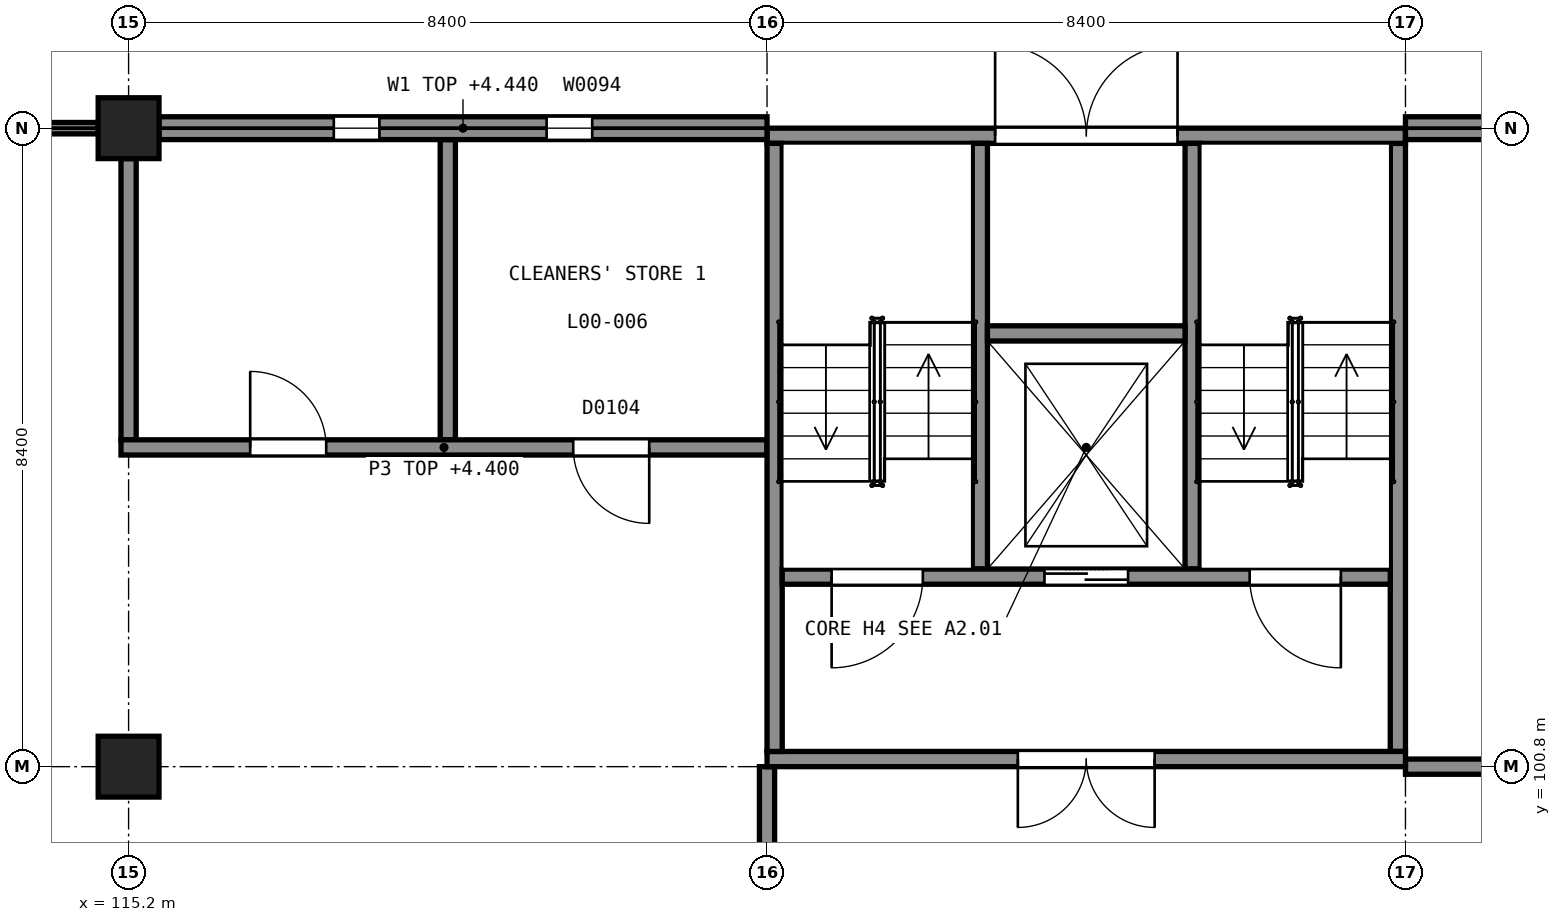
"""IFC4 building model, lengths in metres.
Left out: names, types, materials, properties, quantities, classifications, styles, units other than length and angle.
Written with IfcOpenShell. Run it as: python <this file> out.ifc"""

import sys

from ifc_helpers import new_model, si_unit, direction, frame, frame_2d, origin, origin_2d, place, context, subcontext, project, spatial, rectangle, extrude, element, fill, save


model = new_model("IFC4")
c1 = context("Model", 3, precision=1e-05, world=origin(), true_north=direction((0.0, 1.0)))
c2 = subcontext(c1, "Body", "Model", "MODEL_VIEW")
j1 = project(units=[si_unit("LENGTHUNIT", "METRE"), si_unit("PLANEANGLEUNIT", "RADIAN")], contexts=[c1])
p1 = place(None, origin())
s1 = spatial("IfcSite", under=j1, at=p1, CompositionType="ELEMENT")
p2 = place(p1, origin())
s2 = spatial("IfcBuilding", under=s1, at=p2, CompositionType="ELEMENT")
p3 = place(p2, origin())
s3 = spatial("IfcBuildingStorey", under=s2, at=p3, CompositionType="ELEMENT", Elevation=0.0)
p4 = place(p3, frame((123.6, 100.9, -1.8), z_axis=(0.0, 0.0, 1.0), x_axis=(1.0, 0.0, 0.0)))
e1 = element("IfcWall", 1, at=p4, inside=s3, PredefinedType="SHEAR", context=c2, shape_type="SweptSolid", body=[
    extrude(rectangle(XDim=8.4, YDim=0.2, at=frame_2d((4.2, 0.0))), origin(), (0.0, 0.0, 1.0), 7.3),
])
p5 = place(p4, frame((3.3, 0.0, 1.8)))
e2 = element("IfcOpeningElement", 2, at=p5, cuts=e1, PredefinedType="OPENING", context=c2, shape_type="SweptSolid", body=[
    extrude(rectangle(XDim=1.8, YDim=2.1, at=frame_2d((0.9, 1.05))), frame((0.0, 0.11, 0.0), z_axis=(0.0, -1.0, 0.0), x_axis=(1.0, 0.0, 0.0)), (0.0, 0.0, 1.0), 0.22),
])
p6 = place(p3, frame((123.6, 109.1, -1.8), z_axis=(0.0, 0.0, 1.0), x_axis=(1.0, 0.0, 0.0)))
e3 = element("IfcWall", 3, at=p6, inside=s3, PredefinedType="SHEAR", context=c2, shape_type="SweptSolid", body=[
    extrude(rectangle(XDim=8.4, YDim=0.2, at=frame_2d((4.2, 0.0))), origin(), (0.0, 0.0, 1.0), 7.3),
])
p7 = place(p6, frame((3.001, 0.0, 1.8)))
e4 = element("IfcOpeningElement", 4, at=p7, cuts=e3, PredefinedType="OPENING", context=c2, shape_type="SweptSolid", body=[
    extrude(rectangle(XDim=2.4, YDim=2.1, at=frame_2d((1.2, 1.05))), frame((0.0, 0.11, 0.0), z_axis=(0.0, -1.0, 0.0), x_axis=(1.0, 0.0, 0.0)), (0.0, 0.0, 1.0), 0.22),
])
for number, where, z_axis, x_axis in (
    (5, (123.7, 101.0, -1.8), (0.0, 0.0, 1.0), (0.0, 1.0, 0.0)),
    (6, (131.9, 101.0, -1.8), (0.0, 0.0, 1.0), (0.0, 1.0, 0.0)),
):
    element("IfcWall", number, at=place(p3, frame(where, z_axis=z_axis, x_axis=x_axis)), inside=s3, PredefinedType="SHEAR", context=c2, shape_type="SweptSolid", body=[
        extrude(rectangle(XDim=8.0, YDim=0.2, at=frame_2d((4.0, 0.0))), origin(), (0.0, 0.0, 1.0), 7.3),
    ])
p8 = place(p3, frame((123.8, 103.3, -1.8), z_axis=(0.0, 0.0, 1.0), x_axis=(1.0, 0.0, 0.0)))
e7 = element("IfcWall", 7, at=p8, inside=s3, PredefinedType="SHEAR", context=c2, shape_type="SweptSolid", body=[
    extrude(rectangle(XDim=8.0, YDim=0.2, at=frame_2d((4.0, 0.0))), origin(), (0.0, 0.0, 1.0), 7.3),
])
p9 = place(p8, frame((0.65, 0.0, 1.8)))
e8 = element("IfcOpeningElement", 8, at=p9, cuts=e7, PredefinedType="OPENING", context=c2, shape_type="SweptSolid", body=[
    extrude(rectangle(XDim=1.2, YDim=2.1, at=frame_2d((0.6, 1.05))), frame((0.0, 0.11, 0.0), z_axis=(0.0, -1.0, 0.0), x_axis=(1.0, 0.0, 0.0)), (0.0, 0.0, 1.0), 0.22),
])
p10 = place(p8, frame((6.15, 0.0, 1.8)))
e9 = element("IfcOpeningElement", 9, at=p10, cuts=e7, PredefinedType="OPENING", context=c2, shape_type="SweptSolid", body=[
    extrude(rectangle(XDim=1.2, YDim=2.1, at=frame_2d((0.6, 1.05))), frame((0.0, 0.11, 0.0), z_axis=(0.0, -1.0, 0.0), x_axis=(1.0, 0.0, 0.0)), (0.0, 0.0, 1.0), 0.22),
])
p11 = place(p8, frame((3.45, 0.0, 1.8)))
e10 = element("IfcOpeningElement", 10, at=p11, cuts=e7, PredefinedType="OPENING", context=c2, shape_type="SweptSolid", body=[
    extrude(rectangle(XDim=1.1, YDim=2.1, at=frame_2d((0.55, 1.05))), frame((0.0, 0.11, 0.0), z_axis=(0.0, -1.0, 0.0), x_axis=(1.0, 0.0, 0.0)), (0.0, 0.0, 1.0), 0.22),
])
for number, where, z_axis, x_axis in (
    (11, (126.4, 103.4, -1.8), (0.0, 0.0, 1.0), (0.0, 1.0, 0.0)),
    (12, (129.2, 103.4, -1.8), (0.0, 0.0, 1.0), (0.0, 1.0, 0.0)),
):
    element("IfcWall", number, at=place(p3, frame(where, z_axis=z_axis, x_axis=x_axis)), inside=s3, PredefinedType="SHEAR", context=c2, shape_type="SweptSolid", body=[
        extrude(rectangle(XDim=5.6, YDim=0.2, at=frame_2d((2.8, 0.0))), origin(), (0.0, 0.0, 1.0), 7.3),
    ])
p12 = place(p3, frame((126.5, 106.5, -1.8), z_axis=(0.0, 0.0, 1.0), x_axis=(1.0, 0.0, 0.0)))
e13 = element("IfcWall", 13, at=p12, inside=s3, PredefinedType="SHEAR", context=c2, shape_type="SweptSolid", body=[
    extrude(rectangle(XDim=2.6, YDim=0.2, at=frame_2d((1.3, 0.0))), origin(), (0.0, 0.0, 1.0), 7.3),
])
for number, where, z_axis, x_axis in (
    (14, (115.2, 100.8, -0.3), (0.0, 0.0, 1.0), (1.0, 0.0, 0.0)),
    (15, (115.2, 109.2, -0.3), (0.0, 0.0, 1.0), (1.0, 0.0, 0.0)),
):
    element("IfcColumn", number, at=place(p3, frame(where, z_axis=z_axis, x_axis=x_axis)), inside=s3, PredefinedType="COLUMN", context=c2, shape_type="SweptSolid", body=[
        extrude(rectangle(XDim=0.8, YDim=0.8, at=origin_2d()), origin(), (0.0, 0.0, 1.0), 5.8),
    ])
p13 = place(p3, frame((132.0, 109.2, 0.0), z_axis=(0.0, 0.0, 1.0), x_axis=(1.0, 0.0, 0.0)))
e16 = element("IfcWall", 16, at=p13, inside=s3, PredefinedType="SOLIDWALL", context=c2, shape_type="SweptSolid", body=[
    extrude(rectangle(XDim=8.4, YDim=0.3, at=frame_2d((4.2, 0.0))), origin(), (0.0, 0.0, 1.0), 4.44),
])
p14 = place(p13, frame((2.5, 0.0, 1.5)))
e17 = element("IfcOpeningElement", 17, at=p14, cuts=e16, PredefinedType="OPENING", context=c2, shape_type="SweptSolid", body=[
    extrude(rectangle(XDim=0.6, YDim=2.4, at=frame_2d((0.3, 1.2))), frame((0.0, 0.16, 0.0), z_axis=(0.0, -1.0, 0.0), x_axis=(1.0, 0.0, 0.0)), (0.0, 0.0, 1.0), 0.32),
])
p15 = place(p13, frame((5.3, 0.0, 1.5)))
e18 = element("IfcOpeningElement", 18, at=p15, cuts=e16, PredefinedType="OPENING", context=c2, shape_type="SweptSolid", body=[
    extrude(rectangle(XDim=0.6, YDim=2.4, at=frame_2d((0.3, 1.2))), frame((0.0, 0.16, 0.0), z_axis=(0.0, -1.0, 0.0), x_axis=(1.0, 0.0, 0.0)), (0.0, 0.0, 1.0), 0.32),
])
p16 = place(p3, frame((115.6, 109.2, 0.0), z_axis=(0.0, 0.0, 1.0), x_axis=(1.0, 0.0, 0.0)))
e19 = element("IfcWall", 19, at=p16, inside=s3, PredefinedType="SOLIDWALL", context=c2, shape_type="SweptSolid", body=[
    extrude(rectangle(XDim=8.0, YDim=0.3, at=frame_2d((4.0, 0.0))), origin(), (0.0, 0.0, 1.0), 4.44),
])
p17 = place(p16, frame((2.3, 0.0, 1.5)))
e20 = element("IfcOpeningElement", 20, at=p17, cuts=e19, PredefinedType="OPENING", context=c2, shape_type="SweptSolid", body=[
    extrude(rectangle(XDim=0.6, YDim=2.4, at=frame_2d((0.3, 1.2))), frame((0.0, 0.16, 0.0), z_axis=(0.0, -1.0, 0.0), x_axis=(1.0, 0.0, 0.0)), (0.0, 0.0, 1.0), 0.32),
])
p18 = place(p16, frame((5.1, 0.0, 1.5)))
e21 = element("IfcOpeningElement", 21, at=p18, cuts=e19, PredefinedType="OPENING", context=c2, shape_type="SweptSolid", body=[
    extrude(rectangle(XDim=0.6, YDim=2.4, at=frame_2d((0.3, 1.2))), frame((0.0, 0.16, 0.0), z_axis=(0.0, -1.0, 0.0), x_axis=(1.0, 0.0, 0.0)), (0.0, 0.0, 1.0), 0.32),
])
p19 = place(p3, frame((107.2, 109.2, 0.0), z_axis=(0.0, 0.0, 1.0), x_axis=(1.0, 0.0, 0.0)))
e22 = element("IfcWall", 22, at=p19, inside=s3, PredefinedType="ELEMENTEDWALL", context=c2, shape_type="SweptSolid", body=[
    extrude(rectangle(XDim=7.6, YDim=0.15, at=frame_2d((3.8, 0.0))), origin(), (0.0, 0.0, 1.0), 4.44),
])
p20 = place(p19, frame((0.8, 0.0, 0.0)))
e23 = element("IfcOpeningElement", 23, at=p20, cuts=e22, PredefinedType="OPENING", context=c2, shape_type="SweptSolid", body=[
    extrude(rectangle(XDim=2.0, YDim=2.4, at=frame_2d((1.0, 1.2))), frame((0.0, 0.085, 0.0), z_axis=(0.0, -1.0, 0.0), x_axis=(1.0, 0.0, 0.0)), (0.0, 0.0, 1.0), 0.17),
])
p21 = place(p19, frame((0.8, 0.0, 2.6)))
e24 = element("IfcOpeningElement", 24, at=p21, cuts=e22, PredefinedType="OPENING", context=c2, shape_type="SweptSolid", body=[
    extrude(rectangle(XDim=2.0, YDim=1.74, at=frame_2d((1.0, 0.87))), frame((0.0, 0.085, 0.0), z_axis=(0.0, -1.0, 0.0), x_axis=(1.0, 0.0, 0.0)), (0.0, 0.0, 1.0), 0.17),
])
p22 = place(p19, frame((2.8, 0.0, 0.0)))
e25 = element("IfcOpeningElement", 25, at=p22, cuts=e22, PredefinedType="OPENING", context=c2, shape_type="SweptSolid", body=[
    extrude(rectangle(XDim=2.0, YDim=2.4, at=frame_2d((1.0, 1.2))), frame((0.0, 0.085, 0.0), z_axis=(0.0, -1.0, 0.0), x_axis=(1.0, 0.0, 0.0)), (0.0, 0.0, 1.0), 0.17),
])
p23 = place(p19, frame((2.8, 0.0, 2.6)))
e26 = element("IfcOpeningElement", 26, at=p23, cuts=e22, PredefinedType="OPENING", context=c2, shape_type="SweptSolid", body=[
    extrude(rectangle(XDim=2.0, YDim=1.74, at=frame_2d((1.0, 0.87))), frame((0.0, 0.085, 0.0), z_axis=(0.0, -1.0, 0.0), x_axis=(1.0, 0.0, 0.0)), (0.0, 0.0, 1.0), 0.17),
])
p24 = place(p19, frame((4.8, 0.0, 0.0)))
e27 = element("IfcOpeningElement", 27, at=p24, cuts=e22, PredefinedType="OPENING", context=c2, shape_type="SweptSolid", body=[
    extrude(rectangle(XDim=2.0, YDim=2.4, at=frame_2d((1.0, 1.2))), frame((0.0, 0.085, 0.0), z_axis=(0.0, -1.0, 0.0), x_axis=(1.0, 0.0, 0.0)), (0.0, 0.0, 1.0), 0.17),
])
p25 = place(p19, frame((4.8, 0.0, 2.6)))
e28 = element("IfcOpeningElement", 28, at=p25, cuts=e22, PredefinedType="OPENING", context=c2, shape_type="SweptSolid", body=[
    extrude(rectangle(XDim=2.0, YDim=1.74, at=frame_2d((1.0, 0.87))), frame((0.0, 0.085, 0.0), z_axis=(0.0, -1.0, 0.0), x_axis=(1.0, 0.0, 0.0)), (0.0, 0.0, 1.0), 0.17),
])
p26 = place(p3, frame((119.4, 105.1, 0.0), z_axis=(0.0, 0.0, 1.0), x_axis=(0.0, 1.0, 0.0)))
e29 = element("IfcWall", 29, at=p26, inside=s3, PredefinedType="PARTITIONING", context=c2, shape_type="SweptSolid", body=[
    extrude(rectangle(XDim=3.95, YDim=0.2, at=frame_2d((1.975, 0.0))), origin(), (0.0, 0.0, 1.0), 4.4),
])
p27 = place(p3, frame((115.2, 105.1, 0.0), z_axis=(0.0, 0.0, 1.0), x_axis=(0.0, 1.0, 0.0)))
e30 = element("IfcWall", 30, at=p27, inside=s3, PredefinedType="PARTITIONING", context=c2, shape_type="SweptSolid", body=[
    extrude(rectangle(XDim=3.7, YDim=0.2, at=frame_2d((1.85, 0.0))), origin(), (0.0, 0.0, 1.0), 4.4),
])
p28 = place(p3, frame((115.1, 105.0, 0.0), z_axis=(0.0, 0.0, 1.0), x_axis=(1.0, 0.0, 0.0)))
e31 = element("IfcWall", 31, at=p28, inside=s3, PredefinedType="PARTITIONING", context=c2, shape_type="SweptSolid", body=[
    extrude(rectangle(XDim=8.5, YDim=0.2, at=frame_2d((4.25, 0.0))), origin(), (0.0, 0.0, 1.0), 4.4),
])
p29 = place(p28, frame((1.7, 0.0, 0.0)))
e32 = element("IfcOpeningElement", 32, at=p29, cuts=e31, PredefinedType="OPENING", context=c2, shape_type="SweptSolid", body=[
    extrude(rectangle(XDim=1.0, YDim=2.1, at=frame_2d((0.5, 1.05))), frame((0.0, 0.11, 0.0), z_axis=(0.0, -1.0, 0.0), x_axis=(1.0, 0.0, 0.0)), (0.0, 0.0, 1.0), 0.22),
])
p30 = place(p28, frame((5.95, 0.0, 0.0)))
e33 = element("IfcOpeningElement", 33, at=p30, cuts=e31, PredefinedType="OPENING", context=c2, shape_type="SweptSolid", body=[
    extrude(rectangle(XDim=1.0, YDim=2.1, at=frame_2d((0.5, 1.05))), frame((0.0, 0.11, 0.0), z_axis=(0.0, -1.0, 0.0), x_axis=(1.0, 0.0, 0.0)), (0.0, 0.0, 1.0), 0.22),
])
p31 = place(p3, frame((132.0, 100.8, 0.0), z_axis=(0.0, 0.0, 1.0), x_axis=(1.0, 0.0, 0.0)))
e34 = element("IfcWall", 34, at=p31, inside=s3, PredefinedType="PARTITIONING", context=c2, shape_type="SweptSolid", body=[
    extrude(rectangle(XDim=8.4, YDim=0.2, at=frame_2d((4.2, 0.0))), origin(), (0.0, 0.0, 1.0), 4.4),
])
p32 = place(p31, frame((1.613, 0.0, 0.0)))
e35 = element("IfcOpeningElement", 35, at=p32, cuts=e34, PredefinedType="OPENING", context=c2, shape_type="SweptSolid", body=[
    extrude(rectangle(XDim=0.9, YDim=2.1, at=frame_2d((0.45, 1.05))), frame((0.0, 0.11, 0.0), z_axis=(0.0, -1.0, 0.0), x_axis=(1.0, 0.0, 0.0)), (0.0, 0.0, 1.0), 0.22),
])
p33 = place(p31, frame((5.887, 0.0, 0.0)))
e36 = element("IfcOpeningElement", 36, at=p33, cuts=e34, PredefinedType="OPENING", context=c2, shape_type="SweptSolid", body=[
    extrude(rectangle(XDim=0.9, YDim=2.1, at=frame_2d((0.45, 1.05))), frame((0.0, 0.11, 0.0), z_axis=(0.0, -1.0, 0.0), x_axis=(1.0, 0.0, 0.0)), (0.0, 0.0, 1.0), 0.22),
])
p34 = place(p3, frame((123.6, 92.8, 0.0), z_axis=(0.0, 0.0, 1.0), x_axis=(0.0, 1.0, 0.0)))
e37 = element("IfcWall", 37, at=p34, inside=s3, PredefinedType="PARTITIONING", context=c2, shape_type="SweptSolid", body=[
    extrude(rectangle(XDim=8.0, YDim=0.2, at=frame_2d((4.0, 0.0))), origin(), (0.0, 0.0, 1.0), 4.4),
])
p35 = place(p34, frame((4.575, 0.0, 0.0)))
e38 = element("IfcOpeningElement", 38, at=p35, cuts=e37, PredefinedType="OPENING", context=c2, shape_type="SweptSolid", body=[
    extrude(rectangle(XDim=2.4, YDim=2.4, at=frame_2d((1.2, 1.2))), frame((0.0, 0.11, 0.0), z_axis=(0.0, -1.0, 0.0), x_axis=(1.0, 0.0, 0.0)), (0.0, 0.0, 1.0), 0.22),
])
p36 = place(p17, origin())
e39 = element("IfcWindow", 39, at=p36, inside=s3, PartitioningType="SINGLE_PANEL", PredefinedType="WINDOW", context=c2, shape_type="SweptSolid", body=[
    extrude(rectangle(XDim=0.6, YDim=2.4, at=frame_2d((0.3, 1.2))), frame((0.0, -0.07, 0.0), z_axis=(0.0, -1.0, 0.0), x_axis=(1.0, 0.0, 0.0)), (0.0, 0.0, 1.0), 0.06),
])
fill(e20, e39)
p37 = place(p18, origin())
e40 = element("IfcWindow", 40, at=p37, inside=s3, PartitioningType="SINGLE_PANEL", PredefinedType="WINDOW", context=c2, shape_type="SweptSolid", body=[
    extrude(rectangle(XDim=0.6, YDim=2.4, at=frame_2d((0.3, 1.2))), frame((0.0, -0.07, 0.0), z_axis=(0.0, -1.0, 0.0), x_axis=(1.0, 0.0, 0.0)), (0.0, 0.0, 1.0), 0.06),
])
fill(e21, e40)
p38 = place(p7, origin())
e41 = element("IfcDoor", 41, at=p38, inside=s3, OperationType="DOUBLE_DOOR_SINGLE_SWING", PredefinedType="DOOR", context=c2, shape_type="SweptSolid", body=[
    extrude(rectangle(XDim=2.4, YDim=2.1, at=frame_2d((1.2, 1.05))), frame((0.0, 0.025, 0.0), z_axis=(0.0, -1.0, 0.0), x_axis=(1.0, 0.0, 0.0)), (0.0, 0.0, 1.0), 0.05),
])
fill(e4, e41)
p39 = place(p29, origin())
e42 = element("IfcDoor", 42, at=p39, inside=s3, OperationType="SINGLE_SWING_RIGHT", PredefinedType="DOOR", context=c2, shape_type="SweptSolid", body=[
    extrude(rectangle(XDim=1.0, YDim=2.1, at=frame_2d((0.5, 1.05))), frame((0.0, 0.025, 0.0), z_axis=(0.0, -1.0, 0.0), x_axis=(1.0, 0.0, 0.0)), (0.0, 0.0, 1.0), 0.05),
])
fill(e32, e42)
p40 = place(p30, origin())
e43 = element("IfcDoor", 43, at=p40, inside=s3, OperationType="SINGLE_SWING_RIGHT", PredefinedType="DOOR", context=c2, shape_type="SweptSolid", body=[
    extrude(rectangle(XDim=1.0, YDim=2.1, at=frame_2d((0.5, 1.05))), frame((0.0, 0.025, 0.0), z_axis=(0.0, -1.0, 0.0), x_axis=(1.0, 0.0, 0.0)), (0.0, 0.0, 1.0), 0.05),
])
fill(e33, e43)
p41 = place(p5, origin())
e44 = element("IfcDoor", 44, at=p41, inside=s3, OperationType="DOUBLE_DOOR_SINGLE_SWING", PredefinedType="DOOR", context=c2, shape_type="SweptSolid", body=[
    extrude(rectangle(XDim=1.8, YDim=2.1, at=frame_2d((0.9, 1.05))), frame((0.0, 0.025, 0.0), z_axis=(0.0, -1.0, 0.0), x_axis=(1.0, 0.0, 0.0)), (0.0, 0.0, 1.0), 0.05),
])
fill(e2, e44)
p42 = place(p9, origin())
e45 = element("IfcDoor", 45, at=p42, inside=s3, OperationType="SINGLE_SWING_LEFT", PredefinedType="DOOR", context=c2, shape_type="SweptSolid", body=[
    extrude(rectangle(XDim=1.2, YDim=2.1, at=frame_2d((0.6, 1.05))), frame((0.0, 0.025, 0.0), z_axis=(0.0, -1.0, 0.0), x_axis=(1.0, 0.0, 0.0)), (0.0, 0.0, 1.0), 0.05),
])
fill(e8, e45)
p43 = place(p10, origin())
e46 = element("IfcDoor", 46, at=p43, inside=s3, OperationType="SINGLE_SWING_RIGHT", PredefinedType="DOOR", context=c2, shape_type="SweptSolid", body=[
    extrude(rectangle(XDim=1.2, YDim=2.1, at=frame_2d((0.6, 1.05))), frame((0.0, 0.025, 0.0), z_axis=(0.0, -1.0, 0.0), x_axis=(1.0, 0.0, 0.0)), (0.0, 0.0, 1.0), 0.05),
])
fill(e9, e46)
p44 = place(p11, origin())
e47 = element("IfcDoor", 47, at=p44, inside=s3, OperationType="DOUBLE_DOOR_SLIDING", PredefinedType="DOOR", context=c2, shape_type="SweptSolid", body=[
    extrude(rectangle(XDim=1.1, YDim=2.1, at=frame_2d((0.55, 1.05))), frame((0.0, 0.025, 0.0), z_axis=(0.0, -1.0, 0.0), x_axis=(1.0, 0.0, 0.0)), (0.0, 0.0, 1.0), 0.05),
])
fill(e10, e47)
save(model, sys.argv[1])
